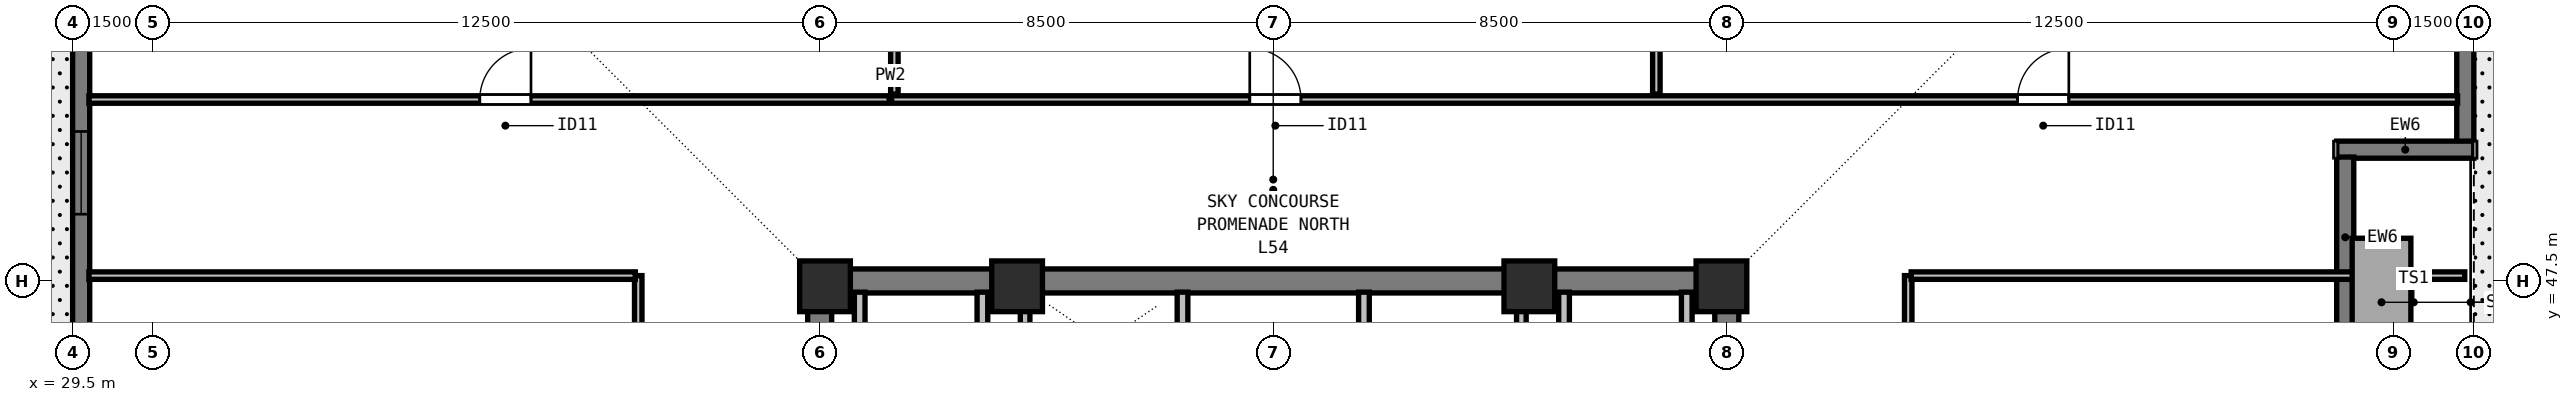
"""IFC4 building model, lengths in metres.
Left out: names, types, materials, properties, quantities, classifications, styles, units other than length and angle.
Written with IfcOpenShell. Run it as: python <this file> out.ifc"""

import sys

from ifc_helpers import new_model, si_unit, direction, frame, frame_2d, origin, origin_2d, place, context, subcontext, project, spatial, rectangle, extrude, element, fill, save


model = new_model("IFC4")
c1 = context("Model", 3, precision=1e-05, world=origin(), true_north=direction((0.0, 1.0)))
c2 = subcontext(c1, "Body", "Model", "MODEL_VIEW")
j1 = project(units=[si_unit("LENGTHUNIT", "METRE"), si_unit("PLANEANGLEUNIT", "RADIAN")], contexts=[c1])
p1 = place(None, origin())
s1 = spatial("IfcSite", under=j1, at=p1, CompositionType="ELEMENT")
p2 = place(p1, origin())
s2 = spatial("IfcBuilding", under=s1, at=p2, CompositionType="ELEMENT")
p3 = place(p2, frame((0.0, 0.0, 198.0)))
s3 = spatial("IfcBuildingStorey", under=s2, at=p3, CompositionType="ELEMENT", Elevation=198.0)
for number, where, z_axis, x_axis in (
    (1, (43.6, 47.4, 0.0), (0.0, 0.0, 1.0), (1.0, 0.0, 0.0)),
    (2, (47.2, 47.4, 0.0), (0.0, 0.0, 1.0), (1.0, 0.0, 0.0)),
    (3, (56.8, 47.4, 0.0), (0.0, 0.0, 1.0), (1.0, 0.0, 0.0)),
    (4, (60.4, 47.4, 0.0), (0.0, 0.0, 1.0), (1.0, 0.0, 0.0)),
):
    element("IfcColumn", number, at=place(p3, frame(where, z_axis=z_axis, x_axis=x_axis)), inside=s3, PredefinedType="COLUMN", context=c2, shape_type="SweptSolid", body=[
        extrude(rectangle(XDim=0.95, YDim=0.95, at=origin_2d()), origin(), (0.0, 0.0, 1.0), 4.5),
    ])
p4 = place(p3, frame((29.66, 42.7, 0.0), z_axis=(0.0, 0.0, 1.0), x_axis=(0.0, 1.0, 0.0)))
e5 = element("IfcWall", 5, at=p4, inside=s3, PredefinedType="SOLIDWALL", context=c2, shape_type="SweptSolid", body=[
    extrude(rectangle(XDim=13.502, YDim=0.32, at=frame_2d((6.751, 0.0))), origin(), (0.0, 0.0, 1.0), 4.29),
])
p5 = place(p4, frame((6.051, 0.0, 0.8)))
e6 = element("IfcOpeningElement", 6, at=p5, cuts=e5, PredefinedType="OPENING", context=c2, shape_type="SweptSolid", body=[
    extrude(rectangle(XDim=1.55, YDim=1.8, at=frame_2d((0.775, 0.9))), frame((0.0, 0.17, 0.0), z_axis=(0.0, -1.0, 0.0), x_axis=(1.0, 0.0, 0.0)), (0.0, 0.0, 1.0), 0.34),
])
p6 = place(p3, frame((74.34, 56.5, 0.0), z_axis=(0.0, 0.0, 1.0), x_axis=(0.0, -1.0, 0.0)))
e7 = element("IfcWall", 7, at=p6, inside=s3, PredefinedType="SOLIDWALL", context=c2, shape_type="SweptSolid", body=[
    extrude(rectangle(XDim=6.402, YDim=0.32, at=frame_2d((3.201, 0.0))), origin(), (0.0, 0.0, 1.0), 4.29),
])
p7 = place(p3, frame((74.5, 49.96, 0.0), z_axis=(0.0, 0.0, 1.0), x_axis=(-1.0, 0.0, 0.0)))
e8 = element("IfcWall", 8, at=p7, inside=s3, PredefinedType="SOLIDWALL", context=c2, shape_type="SweptSolid", body=[
    extrude(rectangle(XDim=2.57, YDim=0.32, at=frame_2d((1.285, 0.0))), origin(), (0.0, 0.0, 1.0), 4.29),
])
p8 = place(p3, frame((72.09, 49.822, 0.0), z_axis=(0.0, 0.0, 1.0), x_axis=(0.0, -1.0, 0.0)))
e9 = element("IfcWall", 9, at=p8, inside=s3, PredefinedType="SOLIDWALL", context=c2, shape_type="SweptSolid", body=[
    extrude(rectangle(XDim=5.742, YDim=0.32, at=frame_2d((2.871, 0.0))), origin(), (0.0, 0.0, 1.0), 4.29),
])
p9 = place(p8, frame((3.157, 0.0, 0.0)))
e10 = element("IfcOpeningElement", 10, at=p9, cuts=e9, PredefinedType="OPENING", context=c2, shape_type="SweptSolid", body=[
    extrude(rectangle(XDim=1.0, YDim=2.15, at=frame_2d((0.5, 1.075))), frame((0.0, 0.17, 0.0), z_axis=(0.0, -1.0, 0.0), x_axis=(1.0, 0.0, 0.0)), (0.0, 0.0, 1.0), 0.34),
])
p10 = place(p3, frame((43.275, 47.5, 0.0), z_axis=(0.0, 0.0, 1.0), x_axis=(1.0, 0.0, 0.0)))
e11 = element("IfcWall", 11, at=p10, inside=s3, PredefinedType="SHEAR", context=c2, shape_type="SweptSolid", body=[
    extrude(rectangle(XDim=17.45, YDim=0.45, at=frame_2d((8.725, 0.0))), origin(), (0.0, 0.0, 1.0), 4.29),
])
for number, where, z_axis, x_axis in (
    (12, (43.5, 40.8, 0.0), (0.0, 0.0, 1.0), (0.0, 1.0, 0.0)),
    (13, (60.5, 40.8, 0.0), (0.0, 0.0, 1.0), (0.0, 1.0, 0.0)),
):
    element("IfcWall", number, at=place(p3, frame(where, z_axis=z_axis, x_axis=x_axis)), inside=s3, PredefinedType="SHEAR", context=c2, shape_type="SweptSolid", body=[
        extrude(rectangle(XDim=6.485, YDim=0.45, at=frame_2d((3.242, 0.0))), origin(), (0.0, 0.0, 1.0), 4.29),
    ])
p11 = place(p3, frame((50.3, 40.585, 0.0), z_axis=(0.0, 0.0, 1.0), x_axis=(0.0, 1.0, 0.0)))
e14 = element("IfcWall", 14, at=p11, inside=s3, PredefinedType="SOLIDWALL", context=c2, shape_type="SweptSolid", body=[
    extrude(rectangle(XDim=6.705, YDim=0.2, at=frame_2d((3.353, 0.0))), origin(), (0.0, 0.0, 1.0), 4.29),
])
p12 = place(p11, frame((0.515, 0.0, 0.0)))
e15 = element("IfcOpeningElement", 15, at=p12, cuts=e14, PredefinedType="OPENING", context=c2, shape_type="SweptSolid", body=[
    extrude(rectangle(XDim=1.1, YDim=2.2, at=frame_2d((0.55, 1.1))), frame((0.0, 0.11, 0.0), z_axis=(0.0, -1.0, 0.0), x_axis=(1.0, 0.0, 0.0)), (0.0, 0.0, 1.0), 0.22),
])
p13 = place(p11, frame((3.015, 0.0, 0.0)))
e16 = element("IfcOpeningElement", 16, at=p13, cuts=e14, PredefinedType="OPENING", context=c2, shape_type="SweptSolid", body=[
    extrude(rectangle(XDim=1.1, YDim=2.2, at=frame_2d((0.55, 1.1))), frame((0.0, 0.11, 0.0), z_axis=(0.0, -1.0, 0.0), x_axis=(1.0, 0.0, 0.0)), (0.0, 0.0, 1.0), 0.22),
])
p14 = place(p11, frame((5.065, 0.0, 0.0)))
e17 = element("IfcOpeningElement", 17, at=p14, cuts=e14, PredefinedType="OPENING", context=c2, shape_type="SweptSolid", body=[
    extrude(rectangle(XDim=0.8, YDim=2.08, at=frame_2d((0.4, 1.04))), frame((0.0, 0.11, 0.0), z_axis=(0.0, -1.0, 0.0), x_axis=(1.0, 0.0, 0.0)), (0.0, 0.0, 1.0), 0.22),
])
p15 = place(p3, frame((53.7, 40.585, 0.0), z_axis=(0.0, 0.0, 1.0), x_axis=(0.0, 1.0, 0.0)))
e18 = element("IfcWall", 18, at=p15, inside=s3, PredefinedType="SOLIDWALL", context=c2, shape_type="SweptSolid", body=[
    extrude(rectangle(XDim=6.705, YDim=0.2, at=frame_2d((3.353, 0.0))), origin(), (0.0, 0.0, 1.0), 4.29),
])
p16 = place(p15, frame((0.195, 0.0, 0.0)))
e19 = element("IfcOpeningElement", 19, at=p16, cuts=e18, PredefinedType="OPENING", context=c2, shape_type="SweptSolid", body=[
    extrude(rectangle(XDim=0.8, YDim=2.08, at=frame_2d((0.4, 1.04))), frame((0.0, 0.11, 0.0), z_axis=(0.0, -1.0, 0.0), x_axis=(1.0, 0.0, 0.0)), (0.0, 0.0, 1.0), 0.22),
])
p17 = place(p15, frame((1.865, 0.0, 0.0)))
e20 = element("IfcOpeningElement", 20, at=p17, cuts=e18, PredefinedType="OPENING", context=c2, shape_type="SweptSolid", body=[
    extrude(rectangle(XDim=1.1, YDim=2.2, at=frame_2d((0.55, 1.1))), frame((0.0, 0.11, 0.0), z_axis=(0.0, -1.0, 0.0), x_axis=(1.0, 0.0, 0.0)), (0.0, 0.0, 1.0), 0.22),
])
p18 = place(p15, frame((4.265, 0.0, 0.0)))
e21 = element("IfcOpeningElement", 21, at=p18, cuts=e18, PredefinedType="OPENING", context=c2, shape_type="SweptSolid", body=[
    extrude(rectangle(XDim=0.95, YDim=2.12, at=frame_2d((0.475, 1.06))), frame((0.0, 0.11, 0.0), z_axis=(0.0, -1.0, 0.0), x_axis=(1.0, 0.0, 0.0)), (0.0, 0.0, 1.0), 0.22),
])
for number, where, z_axis, x_axis in (
    (22, (46.55, 43.735, 0.0), (0.0, 0.0, 1.0), (0.0, 1.0, 0.0)),
    (23, (44.25, 43.735, 0.0), (0.0, 0.0, 1.0), (0.0, 1.0, 0.0)),
    (24, (57.45, 43.735, 0.0), (0.0, 0.0, 1.0), (0.0, 1.0, 0.0)),
    (25, (59.75, 43.735, 0.0), (0.0, 0.0, 1.0), (0.0, 1.0, 0.0)),
):
    element("IfcWall", number, at=place(p3, frame(where, z_axis=z_axis, x_axis=x_axis)), inside=s3, PredefinedType="SOLIDWALL", context=c2, shape_type="SweptSolid", body=[
        extrude(rectangle(XDim=3.555, YDim=0.2, at=frame_2d((1.777, 0.0))), origin(), (0.0, 0.0, 1.0), 4.29),
    ])
for number, where, z_axis, x_axis in (
    (26, (47.35, 43.735, 0.0), (0.0, 0.0, 1.0), (0.0, 1.0, 0.0)),
    (27, (56.65, 43.735, 0.0), (0.0, 0.0, 1.0), (0.0, 1.0, 0.0)),
):
    element("IfcWall", number, at=place(p3, frame(where, z_axis=z_axis, x_axis=x_axis)), inside=s3, PredefinedType="SOLIDWALL", context=c2, shape_type="SweptSolid", body=[
        extrude(rectangle(XDim=3.555, YDim=0.18, at=frame_2d((1.777, 0.0))), origin(), (0.0, 0.0, 1.0), 4.29),
    ])
p19 = place(p3, frame((29.805, 50.9, 0.0), z_axis=(0.0, 0.0, 1.0), x_axis=(1.0, 0.0, 0.0)))
e28 = element("IfcWall", 28, at=p19, inside=s3, PredefinedType="PARTITIONING", context=c2, shape_type="SweptSolid", body=[
    extrude(rectangle(XDim=44.39, YDim=0.14, at=frame_2d((22.195, 0.0))), origin(), (0.0, 0.0, 1.0), 3.958),
])
p20 = place(p19, frame((7.325, 0.0, 0.0)))
e29 = element("IfcOpeningElement", 29, at=p20, cuts=e28, PredefinedType="OPENING", context=c2, shape_type="SweptSolid", body=[
    extrude(rectangle(XDim=0.96, YDim=2.12, at=frame_2d((0.48, 1.06))), frame((0.0, 0.08, 0.0), z_axis=(0.0, -1.0, 0.0), x_axis=(1.0, 0.0, 0.0)), (0.0, 0.0, 1.0), 0.16),
])
p21 = place(p19, frame((21.755, 0.0, 0.0)))
e30 = element("IfcOpeningElement", 30, at=p21, cuts=e28, PredefinedType="OPENING", context=c2, shape_type="SweptSolid", body=[
    extrude(rectangle(XDim=0.96, YDim=2.12, at=frame_2d((0.48, 1.06))), frame((0.0, 0.08, 0.0), z_axis=(0.0, -1.0, 0.0), x_axis=(1.0, 0.0, 0.0)), (0.0, 0.0, 1.0), 0.16),
])
p22 = place(p19, frame((36.145, 0.0, 0.0)))
e31 = element("IfcOpeningElement", 31, at=p22, cuts=e28, PredefinedType="OPENING", context=c2, shape_type="SweptSolid", body=[
    extrude(rectangle(XDim=0.96, YDim=2.12, at=frame_2d((0.48, 1.06))), frame((0.0, 0.08, 0.0), z_axis=(0.0, -1.0, 0.0), x_axis=(1.0, 0.0, 0.0)), (0.0, 0.0, 1.0), 0.16),
])
p23 = place(p3, frame((40.1, 30.4, 0.0), z_axis=(0.0, 0.0, 1.0), x_axis=(0.0, 1.0, 0.0)))
e32 = element("IfcWall", 32, at=p23, inside=s3, PredefinedType="PARTITIONING", context=c2, shape_type="SweptSolid", body=[
    extrude(rectangle(XDim=17.2, YDim=0.14, at=frame_2d((8.6, 0.0))), origin(), (0.0, 0.0, 1.0), 4.29),
])
p24 = place(p23, frame((3.772, 0.0, 0.0)))
e33 = element("IfcOpeningElement", 33, at=p24, cuts=e32, PredefinedType="OPENING", context=c2, shape_type="SweptSolid", body=[
    extrude(rectangle(XDim=0.96, YDim=2.12, at=frame_2d((0.48, 1.06))), frame((0.0, 0.08, 0.0), z_axis=(0.0, -1.0, 0.0), x_axis=(1.0, 0.0, 0.0)), (0.0, 0.0, 1.0), 0.16),
])
p25 = place(p23, frame((12.272, 0.0, 0.0)))
e34 = element("IfcOpeningElement", 34, at=p25, cuts=e32, PredefinedType="OPENING", context=c2, shape_type="SweptSolid", body=[
    extrude(rectangle(XDim=0.96, YDim=2.12, at=frame_2d((0.48, 1.06))), frame((0.0, 0.08, 0.0), z_axis=(0.0, -1.0, 0.0), x_axis=(1.0, 0.0, 0.0)), (0.0, 0.0, 1.0), 0.16),
])
p26 = place(p3, frame((63.9, 30.4, 0.0), z_axis=(0.0, 0.0, 1.0), x_axis=(0.0, 1.0, 0.0)))
e35 = element("IfcWall", 35, at=p26, inside=s3, PredefinedType="PARTITIONING", context=c2, shape_type="SweptSolid", body=[
    extrude(rectangle(XDim=17.2, YDim=0.14, at=frame_2d((8.6, 0.0))), origin(), (0.0, 0.0, 1.0), 4.29),
])
p27 = place(p26, frame((3.968, 0.0, 0.0)))
e36 = element("IfcOpeningElement", 36, at=p27, cuts=e35, PredefinedType="OPENING", context=c2, shape_type="SweptSolid", body=[
    extrude(rectangle(XDim=0.96, YDim=2.12, at=frame_2d((0.48, 1.06))), frame((0.0, 0.08, 0.0), z_axis=(0.0, -1.0, 0.0), x_axis=(1.0, 0.0, 0.0)), (0.0, 0.0, 1.0), 0.16),
])
p28 = place(p26, frame((12.468, 0.0, 0.0)))
e37 = element("IfcOpeningElement", 37, at=p28, cuts=e35, PredefinedType="OPENING", context=c2, shape_type="SweptSolid", body=[
    extrude(rectangle(XDim=0.96, YDim=2.12, at=frame_2d((0.48, 1.06))), frame((0.0, 0.08, 0.0), z_axis=(0.0, -1.0, 0.0), x_axis=(1.0, 0.0, 0.0)), (0.0, 0.0, 1.0), 0.16),
])
p29 = place(p3, frame((29.805, 47.6, 0.0), z_axis=(0.0, 0.0, 1.0), x_axis=(1.0, 0.0, 0.0)))
e38 = element("IfcWall", 38, at=p29, inside=s3, PredefinedType="PARTITIONING", context=c2, shape_type="SweptSolid", body=[
    extrude(rectangle(XDim=10.24, YDim=0.14, at=frame_2d((5.12, 0.0))), origin(), (0.0, 0.0, 1.0), 4.29),
])
p30 = place(p3, frame((63.955, 47.6, 0.0), z_axis=(0.0, 0.0, 1.0), x_axis=(1.0, 0.0, 0.0)))
e39 = element("IfcWall", 39, at=p30, inside=s3, PredefinedType="PARTITIONING", context=c2, shape_type="SweptSolid", body=[
    extrude(rectangle(XDim=10.375, YDim=0.14, at=frame_2d((5.188, 0.0))), origin(), (0.0, 0.0, 1.0), 4.29),
])
for number, where, z_axis, x_axis in (
    (40, (44.9, 51.0, 0.0), (0.0, 0.0, 1.0), (0.0, 1.0, 0.0)),
    (41, (59.18, 51.0, 0.0), (0.0, 0.0, 1.0), (0.0, 1.0, 0.0)),
):
    element("IfcWall", number, at=place(p3, frame(where, z_axis=z_axis, x_axis=x_axis)), inside=s3, PredefinedType="PARTITIONING", context=c2, shape_type="SweptSolid", body=[
        extrude(rectangle(XDim=10.195, YDim=0.14, at=frame_2d((5.098, 0.0))), origin(), (0.0, 0.0, 1.0), 4.29),
    ])
p31 = place(p5, origin())
e42 = element("IfcWindow", 42, at=p31, inside=s3, PartitioningType="SINGLE_PANEL", PredefinedType="WINDOW", context=c2, shape_type="SweptSolid", body=[
    extrude(rectangle(XDim=1.55, YDim=1.8, at=frame_2d((0.775, 0.9))), frame((0.0, -0.04, 0.0), z_axis=(0.0, -1.0, 0.0), x_axis=(1.0, 0.0, 0.0)), (0.0, 0.0, 1.0), 0.06),
])
fill(e6, e42)
p32 = place(p20, origin())
e43 = element("IfcDoor", 43, at=p32, inside=s3, OperationType="SINGLE_SWING_RIGHT", PredefinedType="DOOR", context=c2, shape_type="SweptSolid", body=[
    extrude(rectangle(XDim=0.96, YDim=2.12, at=frame_2d((0.48, 1.06))), frame((0.0, 0.025, 0.0), z_axis=(0.0, -1.0, 0.0), x_axis=(1.0, 0.0, 0.0)), (0.0, 0.0, 1.0), 0.05),
])
fill(e29, e43)
p33 = place(p21, origin())
e44 = element("IfcDoor", 44, at=p33, inside=s3, OperationType="SINGLE_SWING_LEFT", PredefinedType="DOOR", context=c2, shape_type="SweptSolid", body=[
    extrude(rectangle(XDim=0.96, YDim=2.12, at=frame_2d((0.48, 1.06))), frame((0.0, 0.025, 0.0), z_axis=(0.0, -1.0, 0.0), x_axis=(1.0, 0.0, 0.0)), (0.0, 0.0, 1.0), 0.05),
])
fill(e30, e44)
p34 = place(p22, origin())
e45 = element("IfcDoor", 45, at=p34, inside=s3, OperationType="SINGLE_SWING_RIGHT", PredefinedType="DOOR", context=c2, shape_type="SweptSolid", body=[
    extrude(rectangle(XDim=0.96, YDim=2.12, at=frame_2d((0.48, 1.06))), frame((0.0, 0.025, 0.0), z_axis=(0.0, -1.0, 0.0), x_axis=(1.0, 0.0, 0.0)), (0.0, 0.0, 1.0), 0.05),
])
fill(e31, e45)
save(model, sys.argv[1])
